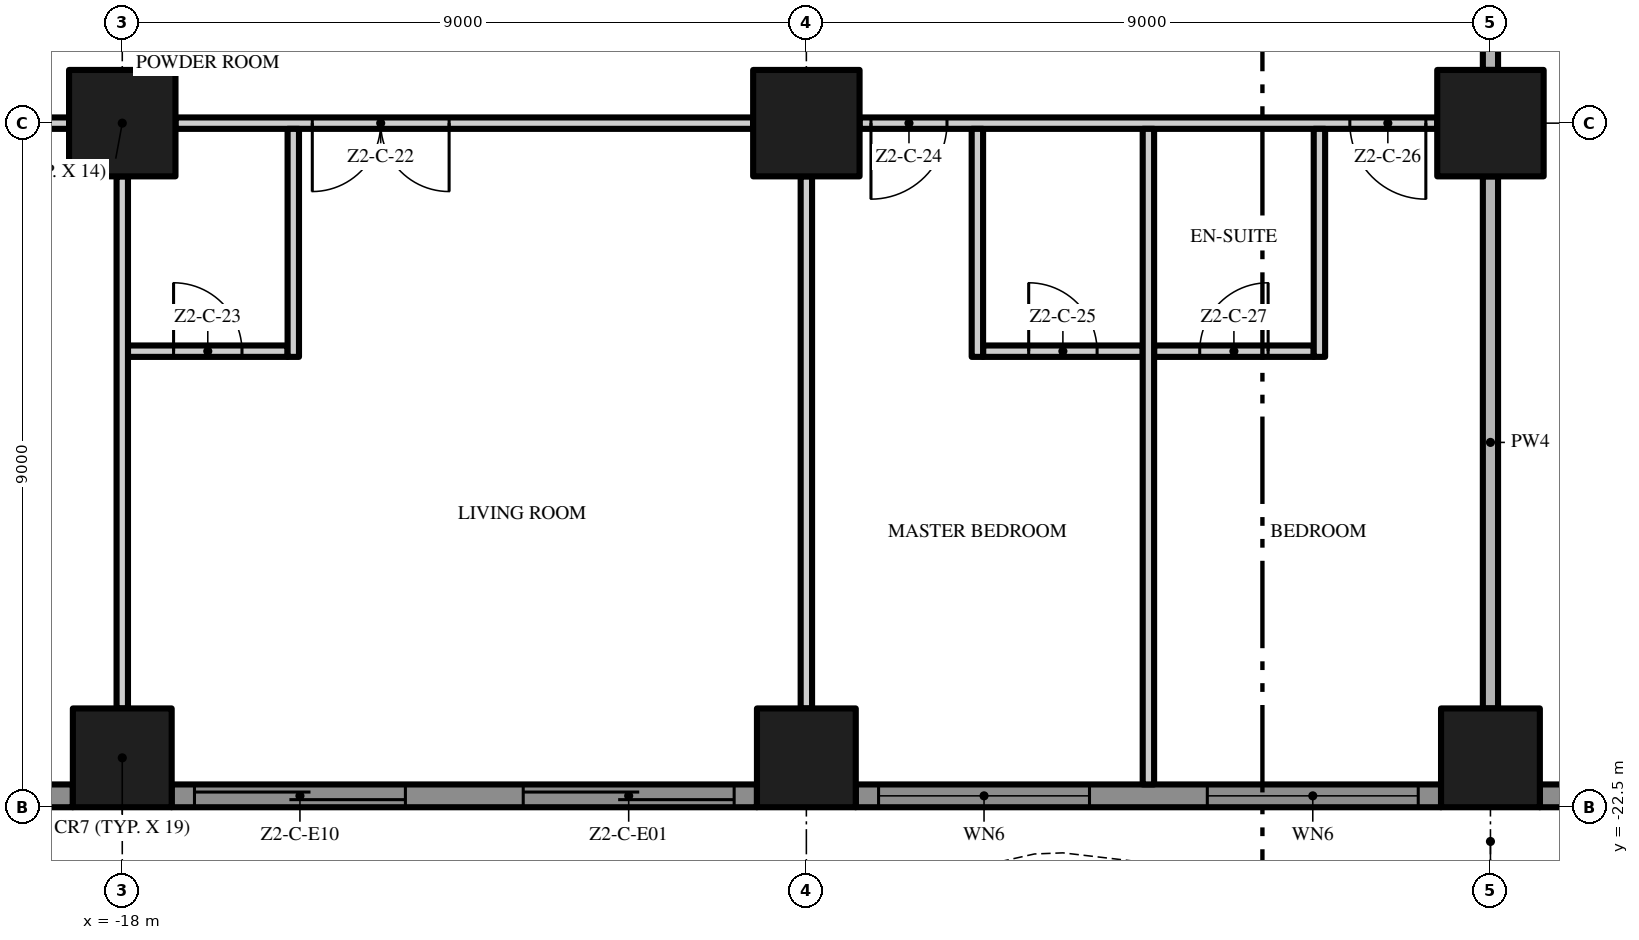
"""IFC4 building model, lengths in metres.
Left out: names, types, materials, properties, quantities, classifications, styles, units other than length and angle.
Written with IfcOpenShell. Run it as: python <this file> out.ifc"""

import sys

from ifc_helpers import new_model, si_unit, direction, frame, frame_2d, origin, origin_2d, place, context, subcontext, project, spatial, polyline, rectangle, outline, extrude, element, fill, save


model = new_model("IFC4")
c1 = context("Model", 3, precision=1e-05, world=origin(), true_north=direction((0.0, 1.0)))
c2 = subcontext(c1, "Body", "Model", "MODEL_VIEW")
j1 = project(units=[si_unit("LENGTHUNIT", "METRE"), si_unit("PLANEANGLEUNIT", "RADIAN")], contexts=[c1])
p1 = place(None, origin())
s1 = spatial("IfcSite", under=j1, at=p1, CompositionType="ELEMENT")
p2 = place(p1, origin())
s2 = spatial("IfcBuilding", under=s1, at=p2, CompositionType="ELEMENT")
p3 = place(p2, frame((0.0, 0.0, 96.0)))
s3 = spatial("IfcBuildingStorey", under=s2, at=p3, CompositionType="ELEMENT", Elevation=96.0)
p4 = place(p3, frame((-18.0, -13.5, 0.0), z_axis=(0.0, 0.0, 1.0), x_axis=(1.0, 0.0, 0.0)))
e1 = element("IfcColumn", 1, at=p4, inside=s3, PredefinedType="COLUMN", context=c2, shape_type="SweptSolid", body=[
    extrude(rectangle(XDim=1.4, YDim=1.4, at=origin_2d()), origin(), (0.0, 0.0, 1.0), 3.5),
])
p5 = place(p3, frame((-18.0, -21.85, 0.0), z_axis=(0.0, 0.0, 1.0), x_axis=(1.0, 0.0, 0.0)))
e2 = element("IfcColumn", 2, at=p5, inside=s3, PredefinedType="COLUMN", context=c2, shape_type="SweptSolid", body=[
    extrude(rectangle(XDim=1.3, YDim=1.3, at=origin_2d()), origin(), (0.0, 0.0, 1.0), 3.5),
])
p6 = place(p3, frame((-9.0, -13.5, 0.0), z_axis=(0.0, 0.0, 1.0), x_axis=(1.0, 0.0, 0.0)))
e3 = element("IfcColumn", 3, at=p6, inside=s3, PredefinedType="COLUMN", context=c2, shape_type="SweptSolid", body=[
    extrude(rectangle(XDim=1.4, YDim=1.4, at=origin_2d()), origin(), (0.0, 0.0, 1.0), 3.5),
])
p7 = place(p3, frame((-9.0, -21.85, 0.0), z_axis=(0.0, 0.0, 1.0), x_axis=(1.0, 0.0, 0.0)))
e4 = element("IfcColumn", 4, at=p7, inside=s3, PredefinedType="COLUMN", context=c2, shape_type="SweptSolid", body=[
    extrude(rectangle(XDim=1.3, YDim=1.3, at=origin_2d()), origin(), (0.0, 0.0, 1.0), 3.5),
])
p8 = place(p3, frame((0.0, -13.5, 0.0), z_axis=(0.0, 0.0, 1.0), x_axis=(1.0, 0.0, 0.0)))
e5 = element("IfcColumn", 5, at=p8, inside=s3, PredefinedType="COLUMN", context=c2, shape_type="SweptSolid", body=[
    extrude(rectangle(XDim=1.4, YDim=1.4, at=origin_2d()), origin(), (0.0, 0.0, 1.0), 3.5),
])
p9 = place(p3, frame((0.0, -21.85, 0.0), z_axis=(0.0, 0.0, 1.0), x_axis=(1.0, 0.0, 0.0)))
e6 = element("IfcColumn", 6, at=p9, inside=s3, PredefinedType="COLUMN", context=c2, shape_type="SweptSolid", body=[
    extrude(rectangle(XDim=1.3, YDim=1.3, at=origin_2d()), origin(), (0.0, 0.0, 1.0), 3.5),
])
p10 = place(p3, frame((-18.65, -22.35, 0.0), z_axis=(0.0, 0.0, 1.0), x_axis=(-1.0, 0.0, 0.0)))
e7 = element("IfcWall", 7, at=p10, inside=s3, PredefinedType="SOLIDWALL", context=c2, shape_type="SweptSolid", body=[
    extrude(rectangle(XDim=3.55, YDim=0.3, at=frame_2d((1.775, 0.0))), origin(), (0.0, 0.0, 1.0), 3.5),
])
p11 = place(p10, frame((0.3, 0.0, 0.45)))
e8 = element("IfcOpeningElement", 8, at=p11, cuts=e7, PredefinedType="OPENING", context=c2, shape_type="SweptSolid", body=[
    extrude(rectangle(XDim=2.775, YDim=2.65, at=frame_2d((1.387, 1.325))), frame((0.0, 0.16, 0.0), z_axis=(0.0, -1.0, 0.0), x_axis=(1.0, 0.0, 0.0)), (0.0, 0.0, 1.0), 0.32),
])
p12 = place(p3, frame((-9.65, -22.35, 0.0), z_axis=(0.0, 0.0, 1.0), x_axis=(-1.0, 0.0, 0.0)))
e9 = element("IfcWall", 9, at=p12, inside=s3, PredefinedType="SOLIDWALL", context=c2, shape_type="SweptSolid", body=[
    extrude(rectangle(XDim=7.7, YDim=0.3, at=frame_2d((3.85, 0.0))), origin(), (0.0, 0.0, 1.0), 3.5),
])
p13 = place(p12, frame((4.625, 0.0, 0.0)))
e10 = element("IfcOpeningElement", 10, at=p13, cuts=e9, PredefinedType="OPENING", context=c2, shape_type="SweptSolid", body=[
    extrude(rectangle(XDim=2.775, YDim=2.4, at=frame_2d((1.387, 1.2))), frame((0.0, 0.16, 0.0), z_axis=(0.0, -1.0, 0.0), x_axis=(1.0, 0.0, 0.0)), (0.0, 0.0, 1.0), 0.32),
])
p14 = place(p12, frame((0.3, 0.0, 0.0)))
e11 = element("IfcOpeningElement", 11, at=p14, cuts=e9, PredefinedType="OPENING", context=c2, shape_type="SweptSolid", body=[
    extrude(rectangle(XDim=2.775, YDim=2.4, at=frame_2d((1.387, 1.2))), frame((0.0, 0.16, 0.0), z_axis=(0.0, -1.0, 0.0), x_axis=(1.0, 0.0, 0.0)), (0.0, 0.0, 1.0), 0.32),
])
p15 = place(p3, frame((-0.65, -22.35, 0.0), z_axis=(0.0, 0.0, 1.0), x_axis=(-1.0, 0.0, 0.0)))
e12 = element("IfcWall", 12, at=p15, inside=s3, PredefinedType="SOLIDWALL", context=c2, shape_type="SweptSolid", body=[
    extrude(rectangle(XDim=7.7, YDim=0.3, at=frame_2d((3.85, 0.0))), origin(), (0.0, 0.0, 1.0), 3.5),
])
p16 = place(p15, frame((4.625, 0.0, 0.45)))
e13 = element("IfcOpeningElement", 13, at=p16, cuts=e12, PredefinedType="OPENING", context=c2, shape_type="SweptSolid", body=[
    extrude(rectangle(XDim=2.775, YDim=2.65, at=frame_2d((1.387, 1.325))), frame((0.0, 0.16, 0.0), z_axis=(0.0, -1.0, 0.0), x_axis=(1.0, 0.0, 0.0)), (0.0, 0.0, 1.0), 0.32),
])
p17 = place(p15, frame((0.3, 0.0, 0.45)))
e14 = element("IfcOpeningElement", 14, at=p17, cuts=e12, PredefinedType="OPENING", context=c2, shape_type="SweptSolid", body=[
    extrude(rectangle(XDim=2.775, YDim=2.65, at=frame_2d((1.387, 1.325))), frame((0.0, 0.16, 0.0), z_axis=(0.0, -1.0, 0.0), x_axis=(1.0, 0.0, 0.0)), (0.0, 0.0, 1.0), 0.32),
])
p18 = place(p3, frame((8.35, -22.35, 0.0), z_axis=(0.0, 0.0, 1.0), x_axis=(-1.0, 0.0, 0.0)))
e15 = element("IfcWall", 15, at=p18, inside=s3, PredefinedType="SOLIDWALL", context=c2, shape_type="SweptSolid", body=[
    extrude(rectangle(XDim=7.7, YDim=0.3, at=frame_2d((3.85, 0.0))), origin(), (0.0, 0.0, 1.0), 3.5),
])
p19 = place(p18, frame((4.625, 0.0, 0.0)))
e16 = element("IfcOpeningElement", 16, at=p19, cuts=e15, PredefinedType="OPENING", context=c2, shape_type="SweptSolid", body=[
    extrude(rectangle(XDim=2.775, YDim=2.4, at=frame_2d((1.387, 1.2))), frame((0.0, 0.16, 0.0), z_axis=(0.0, -1.0, 0.0), x_axis=(1.0, 0.0, 0.0)), (0.0, 0.0, 1.0), 0.32),
])
p20 = place(p18, frame((0.3, 0.0, 0.45)))
e17 = element("IfcOpeningElement", 17, at=p20, cuts=e15, PredefinedType="OPENING", context=c2, shape_type="SweptSolid", body=[
    extrude(rectangle(XDim=2.775, YDim=2.65, at=frame_2d((1.387, 1.325))), frame((0.0, 0.16, 0.0), z_axis=(0.0, -1.0, 0.0), x_axis=(1.0, 0.0, 0.0)), (0.0, 0.0, 1.0), 0.32),
])
p21 = place(p3, origin())
e18 = element("IfcWall", 18, at=p21, inside=s3, PredefinedType="USERDEFINED", context=c2, shape_type="SweptSolid", body=[
    extrude(outline(polyline([(-22.5, -23.451), (-21.0, -23.115), (-20.625, -23.1), (-19.5, -23.231), (-18.0, -23.755), (-16.5, -24.488), (-15.0, -25.149), (-13.5, -25.485), (-13.125, -25.5), (-12.0, -25.369), (-10.5, -24.845), (-9.0, -24.112), (-7.5, -23.451), (-6.0, -23.115), (-5.625, -23.1), (-4.5, -23.231), (-3.0, -23.755), (-1.5, -24.488), (0.0, -25.149), (1.5, -25.485), (1.875, -25.5), (3.0, -25.369), (4.5, -24.845), (6.0, -24.112), (7.5, -23.451), (9.0, -23.115), (9.375, -23.1), (10.5, -23.231), (12.0, -23.755), (13.5, -24.488), (15.0, -25.149), (16.5, -25.485), (16.875, -25.5), (18.0, -25.369), (19.5, -24.845), (21.0, -24.112), (22.5, -23.451), (22.399, -23.223), (20.895, -23.885), (19.404, -24.614), (17.944, -25.124), (16.865, -25.249), (16.533, -25.236), (15.079, -24.91), (13.605, -24.261), (12.096, -23.524), (10.556, -22.986), (9.385, -22.849), (8.967, -22.866), (7.421, -23.213), (5.895, -23.885), (4.404, -24.614), (2.944, -25.124), (1.865, -25.249), (1.533, -25.236), (0.079, -24.91), (-1.395, -24.261), (-2.904, -23.524), (-4.444, -22.986), (-5.615, -22.849), (-6.033, -22.866), (-7.579, -23.213), (-9.105, -23.885), (-10.596, -24.614), (-12.056, -25.124), (-13.135, -25.249), (-13.467, -25.236), (-14.921, -24.91), (-16.395, -24.261), (-17.904, -23.524), (-19.444, -22.986), (-20.615, -22.849), (-21.033, -22.866), (-22.555, -23.208), (-22.5, -23.451)])), origin(), (0.0, 0.0, 1.0), 0.9),
])
p22 = place(p3, frame((-17.925, -16.5, 0.0), z_axis=(0.0, 0.0, 1.0), x_axis=(1.0, 0.0, 0.0)))
e19 = element("IfcWall", 19, at=p22, inside=s3, PredefinedType="PARTITIONING", context=c2, shape_type="SweptSolid", body=[
    extrude(rectangle(XDim=2.1, YDim=0.15, at=frame_2d((1.05, 0.0))), origin(), (0.0, 0.0, 1.0), 3.5),
])
p23 = place(p22, frame((0.6, 0.0, 0.0)))
e20 = element("IfcOpeningElement", 20, at=p23, cuts=e19, PredefinedType="OPENING", context=c2, shape_type="SweptSolid", body=[
    extrude(rectangle(XDim=0.9, YDim=2.1, at=frame_2d((0.45, 1.05))), frame((0.0, 0.085, 0.0), z_axis=(0.0, -1.0, 0.0), x_axis=(1.0, 0.0, 0.0)), (0.0, 0.0, 1.0), 0.17),
])
p24 = place(p3, frame((-6.675, -16.5, 0.0), z_axis=(0.0, 0.0, 1.0), x_axis=(1.0, 0.0, 0.0)))
e21 = element("IfcWall", 21, at=p24, inside=s3, PredefinedType="PARTITIONING", context=c2, shape_type="SweptSolid", body=[
    extrude(rectangle(XDim=2.1, YDim=0.15, at=frame_2d((1.05, 0.0))), origin(), (0.0, 0.0, 1.0), 3.5),
])
p25 = place(p24, frame((0.6, 0.0, 0.0)))
e22 = element("IfcOpeningElement", 22, at=p25, cuts=e21, PredefinedType="OPENING", context=c2, shape_type="SweptSolid", body=[
    extrude(rectangle(XDim=0.9, YDim=2.1, at=frame_2d((0.45, 1.05))), frame((0.0, 0.085, 0.0), z_axis=(0.0, -1.0, 0.0), x_axis=(1.0, 0.0, 0.0)), (0.0, 0.0, 1.0), 0.17),
])
p26 = place(p3, frame((-4.425, -16.5, 0.0), z_axis=(0.0, 0.0, 1.0), x_axis=(1.0, 0.0, 0.0)))
e23 = element("IfcWall", 23, at=p26, inside=s3, PredefinedType="PARTITIONING", context=c2, shape_type="SweptSolid", body=[
    extrude(rectangle(XDim=2.1, YDim=0.15, at=frame_2d((1.05, 0.0))), origin(), (0.0, 0.0, 1.0), 3.5),
])
p27 = place(p26, frame((0.6, 0.0, 0.0)))
e24 = element("IfcOpeningElement", 24, at=p27, cuts=e23, PredefinedType="OPENING", context=c2, shape_type="SweptSolid", body=[
    extrude(rectangle(XDim=0.9, YDim=2.1, at=frame_2d((0.45, 1.05))), frame((0.0, 0.085, 0.0), z_axis=(0.0, -1.0, 0.0), x_axis=(1.0, 0.0, 0.0)), (0.0, 0.0, 1.0), 0.17),
])
p28 = place(p3, frame((-18.7, -13.5, 0.0), z_axis=(0.0, 0.0, 1.0), x_axis=(-1.0, 0.0, 0.0)))
e25 = element("IfcWall", 25, at=p28, inside=s3, PredefinedType="PARTITIONING", context=c2, shape_type="SweptSolid", body=[
    extrude(rectangle(XDim=7.0, YDim=0.15, at=frame_2d((3.5, 0.0))), origin(), (0.0, 0.0, 1.0), 3.5),
])
p29 = place(p28, frame((3.05, 0.0, 0.0)))
e26 = element("IfcOpeningElement", 26, at=p29, cuts=e25, PredefinedType="OPENING", context=c2, shape_type="SweptSolid", body=[
    extrude(rectangle(XDim=1.5, YDim=2.4, at=frame_2d((0.75, 1.2))), frame((0.0, 0.085, 0.0), z_axis=(0.0, -1.0, 0.0), x_axis=(1.0, 0.0, 0.0)), (0.0, 0.0, 1.0), 0.17),
])
p30 = place(p3, frame((-9.7, -13.5, 0.0), z_axis=(0.0, 0.0, 1.0), x_axis=(-1.0, 0.0, 0.0)))
e27 = element("IfcWall", 27, at=p30, inside=s3, PredefinedType="PARTITIONING", context=c2, shape_type="SweptSolid", body=[
    extrude(rectangle(XDim=7.6, YDim=0.15, at=frame_2d((3.8, 0.0))), origin(), (0.0, 0.0, 1.0), 3.5),
])
p31 = place(p30, frame((4.0, 0.0, 0.0)))
e28 = element("IfcOpeningElement", 28, at=p31, cuts=e27, PredefinedType="OPENING", context=c2, shape_type="SweptSolid", body=[
    extrude(rectangle(XDim=1.8, YDim=2.4, at=frame_2d((0.9, 1.2))), frame((0.0, 0.085, 0.0), z_axis=(0.0, -1.0, 0.0), x_axis=(1.0, 0.0, 0.0)), (0.0, 0.0, 1.0), 0.17),
])
p32 = place(p3, frame((-0.7, -13.5, 0.0), z_axis=(0.0, 0.0, 1.0), x_axis=(-1.0, 0.0, 0.0)))
e29 = element("IfcWall", 29, at=p32, inside=s3, PredefinedType="PARTITIONING", context=c2, shape_type="SweptSolid", body=[
    extrude(rectangle(XDim=7.6, YDim=0.15, at=frame_2d((3.8, 0.0))), origin(), (0.0, 0.0, 1.0), 3.5),
])
p33 = place(p32, frame((6.45, 0.0, 0.0)))
e30 = element("IfcOpeningElement", 30, at=p33, cuts=e29, PredefinedType="OPENING", context=c2, shape_type="SweptSolid", body=[
    extrude(rectangle(XDim=1.0, YDim=2.4, at=frame_2d((0.5, 1.2))), frame((0.0, 0.085, 0.0), z_axis=(0.0, -1.0, 0.0), x_axis=(1.0, 0.0, 0.0)), (0.0, 0.0, 1.0), 0.17),
])
p34 = place(p32, frame((0.15, 0.0, 0.0)))
e31 = element("IfcOpeningElement", 31, at=p34, cuts=e29, PredefinedType="OPENING", context=c2, shape_type="SweptSolid", body=[
    extrude(rectangle(XDim=1.0, YDim=2.4, at=frame_2d((0.5, 1.2))), frame((0.0, 0.085, 0.0), z_axis=(0.0, -1.0, 0.0), x_axis=(1.0, 0.0, 0.0)), (0.0, 0.0, 1.0), 0.17),
])
p35 = place(p3, frame((-18.0, -21.2, 0.0), z_axis=(0.0, 0.0, 1.0), x_axis=(0.0, 1.0, 0.0)))
e32 = element("IfcWall", 32, at=p35, inside=s3, PredefinedType="PARTITIONING", context=c2, shape_type="SweptSolid", body=[
    extrude(rectangle(XDim=7.0, YDim=0.15, at=frame_2d((3.5, 0.0))), origin(), (0.0, 0.0, 1.0), 3.5),
])
p36 = place(p3, frame((-15.75, -16.575, 0.0), z_axis=(0.0, 0.0, 1.0), x_axis=(0.0, 1.0, 0.0)))
e33 = element("IfcWall", 33, at=p36, inside=s3, PredefinedType="PARTITIONING", context=c2, shape_type="SweptSolid", body=[
    extrude(rectangle(XDim=3.0, YDim=0.15, at=frame_2d((1.5, 0.0))), origin(), (0.0, 0.0, 1.0), 3.5),
])
p37 = place(p3, frame((-9.0, -21.2, 0.0), z_axis=(0.0, 0.0, 1.0), x_axis=(0.0, 1.0, 0.0)))
e34 = element("IfcWall", 34, at=p37, inside=s3, PredefinedType="PARTITIONING", context=c2, shape_type="SweptSolid", body=[
    extrude(rectangle(XDim=7.0, YDim=0.15, at=frame_2d((3.5, 0.0))), origin(), (0.0, 0.0, 1.0), 3.5),
])
p38 = place(p3, frame((-6.75, -16.575, 0.0), z_axis=(0.0, 0.0, 1.0), x_axis=(0.0, 1.0, 0.0)))
e35 = element("IfcWall", 35, at=p38, inside=s3, PredefinedType="PARTITIONING", context=c2, shape_type="SweptSolid", body=[
    extrude(rectangle(XDim=3.0, YDim=0.15, at=frame_2d((1.5, 0.0))), origin(), (0.0, 0.0, 1.0), 3.5),
])
p39 = place(p3, frame((-4.5, -22.2, 0.0), z_axis=(0.0, 0.0, 1.0), x_axis=(0.0, 1.0, 0.0)))
e36 = element("IfcWall", 36, at=p39, inside=s3, PredefinedType="PARTITIONING", context=c2, shape_type="SweptSolid", body=[
    extrude(rectangle(XDim=8.625, YDim=0.15, at=frame_2d((4.312, 0.0))), origin(), (0.0, 0.0, 1.0), 3.5),
])
p40 = place(p3, frame((-2.25, -16.575, 0.0), z_axis=(0.0, 0.0, 1.0), x_axis=(0.0, 1.0, 0.0)))
e37 = element("IfcWall", 37, at=p40, inside=s3, PredefinedType="PARTITIONING", context=c2, shape_type="SweptSolid", body=[
    extrude(rectangle(XDim=3.0, YDim=0.15, at=frame_2d((1.5, 0.0))), origin(), (0.0, 0.0, 1.0), 3.5),
])
p41 = place(p3, frame((0.0, -21.2, 0.0), z_axis=(0.0, 0.0, 1.0), x_axis=(0.0, 1.0, 0.0)))
e38 = element("IfcWall", 38, at=p41, inside=s3, PredefinedType="PARTITIONING", context=c2, shape_type="SweptSolid", body=[
    extrude(rectangle(XDim=7.0, YDim=0.2, at=frame_2d((3.5, 0.0))), origin(), (0.0, 0.0, 1.0), 3.5),
])
p42 = place(p3, frame((0.0, -12.8, 0.0), z_axis=(0.0, 0.0, 1.0), x_axis=(0.0, 1.0, 0.0)))
e39 = element("IfcWall", 39, at=p42, inside=s3, PredefinedType="PARTITIONING", context=c2, shape_type="SweptSolid", body=[
    extrude(rectangle(XDim=7.6, YDim=0.2, at=frame_2d((3.8, 0.0))), origin(), (0.0, 0.0, 1.0), 3.5),
])
p43 = place(p13, origin())
e40 = element("IfcDoor", 40, at=p43, inside=s3, OperationType="SINGLE_SWING_LEFT", PredefinedType="DOOR", context=c2, shape_type="SweptSolid", body=[
    extrude(rectangle(XDim=2.775, YDim=2.4, at=frame_2d((1.387, 1.2))), frame((0.0, 0.025, 0.0), z_axis=(0.0, -1.0, 0.0), x_axis=(1.0, 0.0, 0.0)), (0.0, 0.0, 1.0), 0.05),
])
fill(e10, e40)
p44 = place(p14, origin())
e41 = element("IfcDoor", 41, at=p44, inside=s3, OperationType="SINGLE_SWING_LEFT", PredefinedType="DOOR", context=c2, shape_type="SweptSolid", body=[
    extrude(rectangle(XDim=2.775, YDim=2.4, at=frame_2d((1.387, 1.2))), frame((0.0, 0.025, 0.0), z_axis=(0.0, -1.0, 0.0), x_axis=(1.0, 0.0, 0.0)), (0.0, 0.0, 1.0), 0.05),
])
fill(e11, e41)
p45 = place(p16, origin())
e42 = element("IfcWindow", 42, at=p45, inside=s3, PartitioningType="SINGLE_PANEL", PredefinedType="WINDOW", context=c2, shape_type="SweptSolid", body=[
    extrude(rectangle(XDim=2.775, YDim=2.65, at=frame_2d((1.387, 1.325))), frame((0.0, 0.03, 0.0), z_axis=(0.0, -1.0, 0.0), x_axis=(1.0, 0.0, 0.0)), (0.0, 0.0, 1.0), 0.06),
])
fill(e13, e42)
p46 = place(p17, origin())
e43 = element("IfcWindow", 43, at=p46, inside=s3, PartitioningType="SINGLE_PANEL", PredefinedType="WINDOW", context=c2, shape_type="SweptSolid", body=[
    extrude(rectangle(XDim=2.775, YDim=2.65, at=frame_2d((1.387, 1.325))), frame((0.0, 0.03, 0.0), z_axis=(0.0, -1.0, 0.0), x_axis=(1.0, 0.0, 0.0)), (0.0, 0.0, 1.0), 0.06),
])
fill(e14, e43)
p47 = place(p31, origin())
e44 = element("IfcDoor", 44, at=p47, inside=s3, OperationType="DOUBLE_DOOR_SINGLE_SWING", PredefinedType="DOOR", context=c2, shape_type="SweptSolid", body=[
    extrude(rectangle(XDim=1.8, YDim=2.4, at=frame_2d((0.9, 1.2))), frame((0.0, 0.025, 0.0), z_axis=(0.0, -1.0, 0.0), x_axis=(1.0, 0.0, 0.0)), (0.0, 0.0, 1.0), 0.05),
])
fill(e28, e44)
p48 = place(p23, origin())
e45 = element("IfcDoor", 45, at=p48, inside=s3, OperationType="SINGLE_SWING_LEFT", PredefinedType="DOOR", context=c2, shape_type="SweptSolid", body=[
    extrude(rectangle(XDim=0.9, YDim=2.1, at=frame_2d((0.45, 1.05))), frame((0.0, 0.025, 0.0), z_axis=(0.0, -1.0, 0.0), x_axis=(1.0, 0.0, 0.0)), (0.0, 0.0, 1.0), 0.05),
])
fill(e20, e45)
p49 = place(p33, origin())
e46 = element("IfcDoor", 46, at=p49, inside=s3, OperationType="SINGLE_SWING_RIGHT", PredefinedType="DOOR", context=c2, shape_type="SweptSolid", body=[
    extrude(rectangle(XDim=1.0, YDim=2.4, at=frame_2d((0.5, 1.2))), frame((0.0, 0.025, 0.0), z_axis=(0.0, -1.0, 0.0), x_axis=(1.0, 0.0, 0.0)), (0.0, 0.0, 1.0), 0.05),
])
fill(e30, e46)
p50 = place(p25, origin())
e47 = element("IfcDoor", 47, at=p50, inside=s3, OperationType="SINGLE_SWING_LEFT", PredefinedType="DOOR", context=c2, shape_type="SweptSolid", body=[
    extrude(rectangle(XDim=0.9, YDim=2.1, at=frame_2d((0.45, 1.05))), frame((0.0, 0.025, 0.0), z_axis=(0.0, -1.0, 0.0), x_axis=(1.0, 0.0, 0.0)), (0.0, 0.0, 1.0), 0.05),
])
fill(e22, e47)
p51 = place(p34, origin())
e48 = element("IfcDoor", 48, at=p51, inside=s3, OperationType="SINGLE_SWING_LEFT", PredefinedType="DOOR", context=c2, shape_type="SweptSolid", body=[
    extrude(rectangle(XDim=1.0, YDim=2.4, at=frame_2d((0.5, 1.2))), frame((0.0, 0.025, 0.0), z_axis=(0.0, -1.0, 0.0), x_axis=(1.0, 0.0, 0.0)), (0.0, 0.0, 1.0), 0.05),
])
fill(e31, e48)
p52 = place(p27, origin())
e49 = element("IfcDoor", 49, at=p52, inside=s3, OperationType="SINGLE_SWING_RIGHT", PredefinedType="DOOR", context=c2, shape_type="SweptSolid", body=[
    extrude(rectangle(XDim=0.9, YDim=2.1, at=frame_2d((0.45, 1.05))), frame((0.0, 0.025, 0.0), z_axis=(0.0, -1.0, 0.0), x_axis=(1.0, 0.0, 0.0)), (0.0, 0.0, 1.0), 0.05),
])
fill(e24, e49)
save(model, sys.argv[1])
